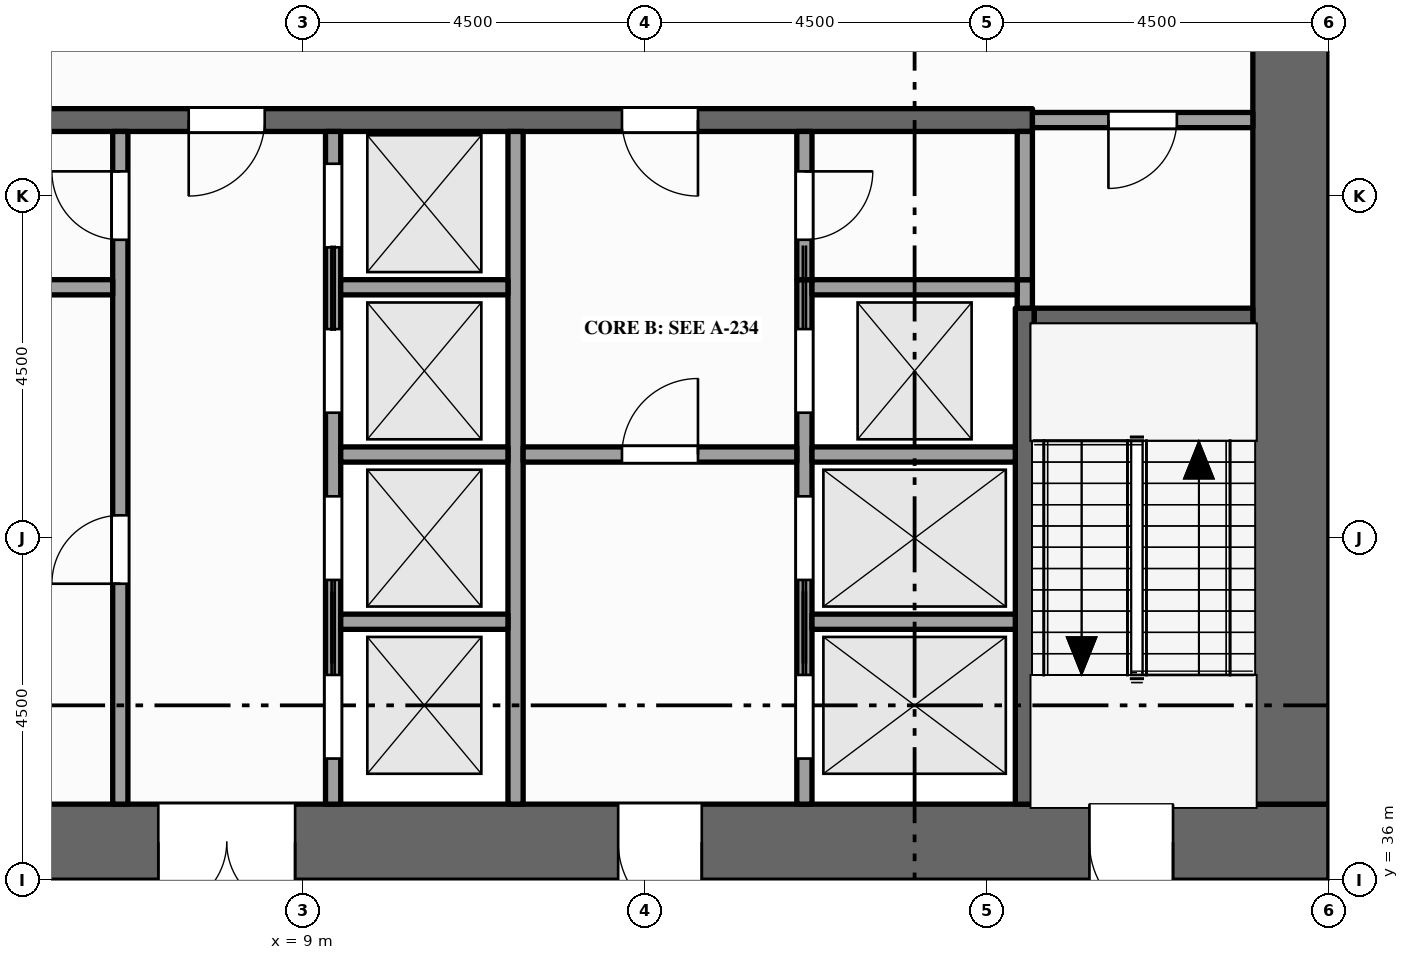
"""IFC4 building model, lengths in metres.
Left out: names, types, materials, properties, quantities, classifications, styles, units other than length and angle.
Written with IfcOpenShell. Run it as: python <this file> out.ifc"""

import sys

from ifc_helpers import new_model, si_unit, direction, frame, frame_2d, origin, place, context, subcontext, project, spatial, rectangle, extrude, element, fill, save


model = new_model("IFC4")
c1 = context("Model", 3, precision=1e-05, world=origin(), true_north=direction((0.0, 1.0)))
c2 = subcontext(c1, "Body", "Model", "MODEL_VIEW")
j1 = project(units=[si_unit("LENGTHUNIT", "METRE"), si_unit("PLANEANGLEUNIT", "RADIAN")], contexts=[c1])
p1 = place(None, origin())
s1 = spatial("IfcSite", under=j1, at=p1, CompositionType="ELEMENT")
p2 = place(p1, origin())
s2 = spatial("IfcBuilding", under=s1, at=p2, CompositionType="ELEMENT")
p3 = place(p2, frame((0.0, 0.0, 187.0)))
s3 = spatial("IfcBuildingStorey", under=s2, at=p3, CompositionType="ELEMENT", Elevation=187.0)
p4 = place(p3, frame((0.0, 36.5, -0.15), z_axis=(0.0, 0.0, 1.0), x_axis=(1.0, 0.0, 0.0)))
e1 = element("IfcWall", 1, at=p4, inside=s3, PredefinedType="SHEAR", context=c2, shape_type="SweptSolid", body=[
    extrude(rectangle(XDim=22.5, YDim=1.0, at=frame_2d((11.25, 0.0))), origin(), (0.0, 0.0, 1.0), 8.0),
])
p5 = place(p4, frame((7.1, 0.0, 0.15)))
e2 = element("IfcOpeningElement", 2, at=p5, cuts=e1, PredefinedType="OPENING", context=c2, shape_type="SweptSolid", body=[
    extrude(rectangle(XDim=1.8, YDim=2.1, at=frame_2d((0.9, 1.05))), frame((0.0, 0.51, 0.0), z_axis=(0.0, -1.0, 0.0), x_axis=(1.0, 0.0, 0.0)), (0.0, 0.0, 1.0), 1.02),
])
p6 = place(p4, frame((13.15, 0.0, 0.15)))
e3 = element("IfcOpeningElement", 3, at=p6, cuts=e1, PredefinedType="OPENING", context=c2, shape_type="SweptSolid", body=[
    extrude(rectangle(XDim=1.1, YDim=2.1, at=frame_2d((0.55, 1.05))), frame((0.0, 0.51, 0.0), z_axis=(0.0, -1.0, 0.0), x_axis=(1.0, 0.0, 0.0)), (0.0, 0.0, 1.0), 1.02),
])
p7 = place(p4, frame((2.15, 0.0, 0.15)))
e4 = element("IfcOpeningElement", 4, at=p7, cuts=e1, PredefinedType="OPENING", context=c2, shape_type="SweptSolid", body=[
    extrude(rectangle(XDim=1.1, YDim=2.1, at=frame_2d((0.55, 1.05))), frame((0.0, 0.51, 0.0), z_axis=(0.0, -1.0, 0.0), x_axis=(1.0, 0.0, 0.0)), (0.0, 0.0, 1.0), 1.02),
])
p8 = place(p4, frame((19.35, 0.0, 0.15)))
e5 = element("IfcOpeningElement", 5, at=p8, cuts=e1, PredefinedType="OPENING", context=c2, shape_type="SweptSolid", body=[
    extrude(rectangle(XDim=1.1, YDim=2.1, at=frame_2d((0.55, 1.05))), frame((0.0, 0.51, 0.0), z_axis=(0.0, -1.0, 0.0), x_axis=(1.0, 0.0, 0.0)), (0.0, 0.0, 1.0), 1.02),
])
p9 = place(p3, frame((22.0, 37.0, -0.15), z_axis=(0.0, 0.0, 1.0), x_axis=(0.0, 1.0, 0.0)))
e6 = element("IfcWall", 6, at=p9, inside=s3, PredefinedType="SHEAR", context=c2, shape_type="SweptSolid", body=[
    extrude(rectangle(XDim=11.5, YDim=1.0, at=frame_2d((5.75, 0.0))), origin(), (0.0, 0.0, 1.0), 8.0),
])
p10 = place(p3, frame((6.6, 37.0, 0.0), z_axis=(0.0, 0.0, 1.0), x_axis=(0.0, 1.0, 0.0)))
e7 = element("IfcWall", 7, at=p10, inside=s3, PredefinedType="PARTITIONING", context=c2, shape_type="SweptSolid", body=[
    extrude(rectangle(XDim=8.85, YDim=0.2, at=frame_2d((4.425, 0.0))), origin(), (0.0, 0.0, 1.0), 7.85),
])
p11 = place(p10, frame((2.9, 0.0, 0.0)))
e8 = element("IfcOpeningElement", 8, at=p11, cuts=e7, PredefinedType="OPENING", context=c2, shape_type="SweptSolid", body=[
    extrude(rectangle(XDim=0.9, YDim=2.1, at=frame_2d((0.45, 1.05))), frame((0.0, 0.11, 0.0), z_axis=(0.0, -1.0, 0.0), x_axis=(1.0, 0.0, 0.0)), (0.0, 0.0, 1.0), 0.22),
])
p12 = place(p10, frame((7.425, 0.0, 0.0)))
e9 = element("IfcOpeningElement", 9, at=p12, cuts=e7, PredefinedType="OPENING", context=c2, shape_type="SweptSolid", body=[
    extrude(rectangle(XDim=0.9, YDim=2.1, at=frame_2d((0.45, 1.05))), frame((0.0, 0.11, 0.0), z_axis=(0.0, -1.0, 0.0), x_axis=(1.0, 0.0, 0.0)), (0.0, 0.0, 1.0), 0.22),
])
p13 = place(p3, frame((9.4, 37.0, 0.0), z_axis=(0.0, 0.0, 1.0), x_axis=(0.0, 1.0, 0.0)))
e10 = element("IfcWall", 10, at=p13, inside=s3, PredefinedType="SOLIDWALL", context=c2, shape_type="SweptSolid", body=[
    extrude(rectangle(XDim=8.85, YDim=0.2, at=frame_2d((4.425, 0.0))), origin(), (0.0, 0.0, 1.0), 7.85),
])
p14 = place(p13, frame((0.6, 0.0, 0.012)))
e11 = element("IfcOpeningElement", 11, at=p14, cuts=e10, PredefinedType="OPENING", context=c2, shape_type="SweptSolid", body=[
    extrude(rectangle(XDim=1.1, YDim=2.1, at=frame_2d((0.55, 1.05))), frame((0.0, 0.11, 0.0), z_axis=(0.0, -1.0, 0.0), x_axis=(1.0, 0.0, 0.0)), (0.0, 0.0, 1.0), 0.22),
])
p15 = place(p13, frame((2.95, 0.0, 0.012)))
e12 = element("IfcOpeningElement", 12, at=p15, cuts=e10, PredefinedType="OPENING", context=c2, shape_type="SweptSolid", body=[
    extrude(rectangle(XDim=1.1, YDim=2.1, at=frame_2d((0.55, 1.05))), frame((0.0, 0.11, 0.0), z_axis=(0.0, -1.0, 0.0), x_axis=(1.0, 0.0, 0.0)), (0.0, 0.0, 1.0), 0.22),
])
p16 = place(p13, frame((5.15, 0.0, 0.012)))
e13 = element("IfcOpeningElement", 13, at=p16, cuts=e10, PredefinedType="OPENING", context=c2, shape_type="SweptSolid", body=[
    extrude(rectangle(XDim=1.1, YDim=2.1, at=frame_2d((0.55, 1.05))), frame((0.0, 0.11, 0.0), z_axis=(0.0, -1.0, 0.0), x_axis=(1.0, 0.0, 0.0)), (0.0, 0.0, 1.0), 0.22),
])
p17 = place(p13, frame((7.325, 0.0, 0.012)))
e14 = element("IfcOpeningElement", 14, at=p17, cuts=e10, PredefinedType="OPENING", context=c2, shape_type="SweptSolid", body=[
    extrude(rectangle(XDim=1.1, YDim=2.1, at=frame_2d((0.55, 1.05))), frame((0.0, 0.11, 0.0), z_axis=(0.0, -1.0, 0.0), x_axis=(1.0, 0.0, 0.0)), (0.0, 0.0, 1.0), 0.22),
])
p18 = place(p3, frame((11.8, 37.0, 0.0), z_axis=(0.0, 0.0, 1.0), x_axis=(0.0, 1.0, 0.0)))
e15 = element("IfcWall", 15, at=p18, inside=s3, PredefinedType="SOLIDWALL", context=c2, shape_type="SweptSolid", body=[
    extrude(rectangle(XDim=8.85, YDim=0.2, at=frame_2d((4.425, 0.0))), origin(), (0.0, 0.0, 1.0), 7.85),
])
p19 = place(p3, frame((15.6, 37.0, 0.0), z_axis=(0.0, 0.0, 1.0), x_axis=(0.0, 1.0, 0.0)))
e16 = element("IfcWall", 16, at=p19, inside=s3, PredefinedType="SOLIDWALL", context=c2, shape_type="SweptSolid", body=[
    extrude(rectangle(XDim=6.9, YDim=0.2, at=frame_2d((3.45, 0.0))), origin(), (0.0, 0.0, 1.0), 7.85),
])
p20 = place(p19, frame((0.6, 0.0, 0.012)))
e17 = element("IfcOpeningElement", 17, at=p20, cuts=e16, PredefinedType="OPENING", context=c2, shape_type="SweptSolid", body=[
    extrude(rectangle(XDim=1.1, YDim=2.1, at=frame_2d((0.55, 1.05))), frame((0.0, 0.11, 0.0), z_axis=(0.0, -1.0, 0.0), x_axis=(1.0, 0.0, 0.0)), (0.0, 0.0, 1.0), 0.22),
])
p21 = place(p19, frame((2.95, 0.0, 0.012)))
e18 = element("IfcOpeningElement", 18, at=p21, cuts=e16, PredefinedType="OPENING", context=c2, shape_type="SweptSolid", body=[
    extrude(rectangle(XDim=1.1, YDim=2.1, at=frame_2d((0.55, 1.05))), frame((0.0, 0.11, 0.0), z_axis=(0.0, -1.0, 0.0), x_axis=(1.0, 0.0, 0.0)), (0.0, 0.0, 1.0), 0.22),
])
p22 = place(p19, frame((5.15, 0.0, 0.012)))
e19 = element("IfcOpeningElement", 19, at=p22, cuts=e16, PredefinedType="OPENING", context=c2, shape_type="SweptSolid", body=[
    extrude(rectangle(XDim=1.1, YDim=2.1, at=frame_2d((0.55, 1.05))), frame((0.0, 0.11, 0.0), z_axis=(0.0, -1.0, 0.0), x_axis=(1.0, 0.0, 0.0)), (0.0, 0.0, 1.0), 0.22),
])
p23 = place(p3, frame((15.6, 43.9, 0.0), z_axis=(0.0, 0.0, 1.0), x_axis=(0.0, 1.0, 0.0)))
e20 = element("IfcWall", 20, at=p23, inside=s3, PredefinedType="PARTITIONING", context=c2, shape_type="SweptSolid", body=[
    extrude(rectangle(XDim=1.95, YDim=0.2, at=frame_2d((0.975, 0.0))), origin(), (0.0, 0.0, 1.0), 7.85),
])
p24 = place(p23, frame((0.525, 0.0, 0.0)))
e21 = element("IfcOpeningElement", 21, at=p24, cuts=e20, PredefinedType="OPENING", context=c2, shape_type="SweptSolid", body=[
    extrude(rectangle(XDim=0.9, YDim=2.1, at=frame_2d((0.45, 1.05))), frame((0.0, 0.11, 0.0), z_axis=(0.0, -1.0, 0.0), x_axis=(1.0, 0.0, 0.0)), (0.0, 0.0, 1.0), 0.22),
])
p25 = place(p3, frame((18.5, 37.0, 0.0), z_axis=(0.0, 0.0, 1.0), x_axis=(0.0, 1.0, 0.0)))
e22 = element("IfcWall", 22, at=p25, inside=s3, PredefinedType="SHEAR", context=c2, shape_type="SweptSolid", body=[
    extrude(rectangle(XDim=6.525, YDim=0.25, at=frame_2d((3.262, 0.0))), origin(), (0.0, 0.0, 1.0), 7.85),
])
p26 = place(p3, frame((18.5, 43.525, 0.0), z_axis=(0.0, 0.0, 1.0), x_axis=(0.0, 1.0, 0.0)))
e23 = element("IfcWall", 23, at=p26, inside=s3, PredefinedType="SOLIDWALL", context=c2, shape_type="SweptSolid", body=[
    extrude(rectangle(XDim=0.375, YDim=0.2, at=frame_2d((0.188, 0.0))), origin(), (0.0, 0.0, 1.0), 7.85),
])
p27 = place(p3, frame((18.5, 43.9, 0.0), z_axis=(0.0, 0.0, 1.0), x_axis=(0.0, 1.0, 0.0)))
e24 = element("IfcWall", 24, at=p27, inside=s3, PredefinedType="PARTITIONING", context=c2, shape_type="SweptSolid", body=[
    extrude(rectangle(XDim=1.95, YDim=0.2, at=frame_2d((0.975, 0.0))), origin(), (0.0, 0.0, 1.0), 7.85),
])
p28 = place(p3, frame((9.5, 39.4, 0.0), z_axis=(0.0, 0.0, 1.0), x_axis=(1.0, 0.0, 0.0)))
e25 = element("IfcWall", 25, at=p28, inside=s3, PredefinedType="SOLIDWALL", context=c2, shape_type="SweptSolid", body=[
    extrude(rectangle(XDim=2.2, YDim=0.2, at=frame_2d((1.1, 0.0))), origin(), (0.0, 0.0, 1.0), 7.85),
])
p29 = place(p3, frame((15.7, 39.4, 0.0), z_axis=(0.0, 0.0, 1.0), x_axis=(1.0, 0.0, 0.0)))
e26 = element("IfcWall", 26, at=p29, inside=s3, PredefinedType="SOLIDWALL", context=c2, shape_type="SweptSolid", body=[
    extrude(rectangle(XDim=2.675, YDim=0.2, at=frame_2d((1.337, 0.0))), origin(), (0.0, 0.0, 1.0), 7.85),
])
p30 = place(p3, frame((9.5, 41.6, 0.0), z_axis=(0.0, 0.0, 1.0), x_axis=(1.0, 0.0, 0.0)))
e27 = element("IfcWall", 27, at=p30, inside=s3, PredefinedType="SOLIDWALL", context=c2, shape_type="SweptSolid", body=[
    extrude(rectangle(XDim=2.2, YDim=0.2, at=frame_2d((1.1, 0.0))), origin(), (0.0, 0.0, 1.0), 7.85),
])
p31 = place(p3, frame((11.9, 41.6, 0.0), z_axis=(0.0, 0.0, 1.0), x_axis=(1.0, 0.0, 0.0)))
e28 = element("IfcWall", 28, at=p31, inside=s3, PredefinedType="PARTITIONING", context=c2, shape_type="SweptSolid", body=[
    extrude(rectangle(XDim=3.6, YDim=0.2, at=frame_2d((1.8, 0.0))), origin(), (0.0, 0.0, 1.0), 7.85),
])
p32 = place(p31, frame((1.3, 0.0, 0.0)))
e29 = element("IfcOpeningElement", 29, at=p32, cuts=e28, PredefinedType="OPENING", context=c2, shape_type="SweptSolid", body=[
    extrude(rectangle(XDim=1.0, YDim=2.1, at=frame_2d((0.5, 1.05))), frame((0.0, 0.11, 0.0), z_axis=(0.0, -1.0, 0.0), x_axis=(1.0, 0.0, 0.0)), (0.0, 0.0, 1.0), 0.22),
])
p33 = place(p3, frame((15.7, 41.6, 0.0), z_axis=(0.0, 0.0, 1.0), x_axis=(1.0, 0.0, 0.0)))
e30 = element("IfcWall", 30, at=p33, inside=s3, PredefinedType="SOLIDWALL", context=c2, shape_type="SweptSolid", body=[
    extrude(rectangle(XDim=2.675, YDim=0.2, at=frame_2d((1.337, 0.0))), origin(), (0.0, 0.0, 1.0), 7.85),
])
p34 = place(p3, frame((18.625, 43.4, 0.0), z_axis=(0.0, 0.0, 1.0), x_axis=(1.0, 0.0, 0.0)))
e31 = element("IfcWall", 31, at=p34, inside=s3, PredefinedType="SHEAR", context=c2, shape_type="SweptSolid", body=[
    extrude(rectangle(XDim=2.875, YDim=0.25, at=frame_2d((1.438, 0.0))), origin(), (0.0, 0.0, 1.0), 7.85),
])
p35 = place(p3, frame((4.3, 43.8, 0.0), z_axis=(0.0, 0.0, 1.0), x_axis=(1.0, 0.0, 0.0)))
e32 = element("IfcWall", 32, at=p35, inside=s3, PredefinedType="PARTITIONING", context=c2, shape_type="SweptSolid", body=[
    extrude(rectangle(XDim=2.2, YDim=0.2, at=frame_2d((1.1, 0.0))), origin(), (0.0, 0.0, 1.0), 7.85),
])
p36 = place(p3, frame((9.5, 43.8, 0.0), z_axis=(0.0, 0.0, 1.0), x_axis=(1.0, 0.0, 0.0)))
e33 = element("IfcWall", 33, at=p36, inside=s3, PredefinedType="SOLIDWALL", context=c2, shape_type="SweptSolid", body=[
    extrude(rectangle(XDim=2.2, YDim=0.2, at=frame_2d((1.1, 0.0))), origin(), (0.0, 0.0, 1.0), 7.85),
])
p37 = place(p3, frame((15.7, 43.8, 0.0), z_axis=(0.0, 0.0, 1.0), x_axis=(1.0, 0.0, 0.0)))
e34 = element("IfcWall", 34, at=p37, inside=s3, PredefinedType="SOLIDWALL", context=c2, shape_type="SweptSolid", body=[
    extrude(rectangle(XDim=2.7, YDim=0.2, at=frame_2d((1.35, 0.0))), origin(), (0.0, 0.0, 1.0), 7.85),
])
p38 = place(p3, frame((4.1, 46.0, 0.0), z_axis=(0.0, 0.0, 1.0), x_axis=(1.0, 0.0, 0.0)))
e35 = element("IfcWall", 35, at=p38, inside=s3, PredefinedType="SHEAR", context=c2, shape_type="SweptSolid", body=[
    extrude(rectangle(XDim=14.5, YDim=0.3, at=frame_2d((7.25, 0.0))), origin(), (0.0, 0.0, 1.0), 7.85),
])
p39 = place(p38, frame((3.4, 0.0, 0.0)))
e36 = element("IfcOpeningElement", 36, at=p39, cuts=e35, PredefinedType="OPENING", context=c2, shape_type="SweptSolid", body=[
    extrude(rectangle(XDim=1.0, YDim=2.1, at=frame_2d((0.5, 1.05))), frame((0.0, 0.16, 0.0), z_axis=(0.0, -1.0, 0.0), x_axis=(1.0, 0.0, 0.0)), (0.0, 0.0, 1.0), 0.32),
])
p40 = place(p38, frame((9.1, 0.0, 0.0)))
e37 = element("IfcOpeningElement", 37, at=p40, cuts=e35, PredefinedType="OPENING", context=c2, shape_type="SweptSolid", body=[
    extrude(rectangle(XDim=1.0, YDim=2.1, at=frame_2d((0.5, 1.05))), frame((0.0, 0.16, 0.0), z_axis=(0.0, -1.0, 0.0), x_axis=(1.0, 0.0, 0.0)), (0.0, 0.0, 1.0), 0.32),
])
p41 = place(p3, frame((18.6, 46.0, 0.0), z_axis=(0.0, 0.0, 1.0), x_axis=(1.0, 0.0, 0.0)))
e38 = element("IfcWall", 38, at=p41, inside=s3, PredefinedType="PARTITIONING", context=c2, shape_type="SweptSolid", body=[
    extrude(rectangle(XDim=2.9, YDim=0.2, at=frame_2d((1.45, 0.0))), origin(), (0.0, 0.0, 1.0), 7.85),
])
p42 = place(p41, frame((1.0, 0.0, 0.0)))
e39 = element("IfcOpeningElement", 39, at=p42, cuts=e38, PredefinedType="OPENING", context=c2, shape_type="SweptSolid", body=[
    extrude(rectangle(XDim=0.9, YDim=2.1, at=frame_2d((0.45, 1.05))), frame((0.0, 0.11, 0.0), z_axis=(0.0, -1.0, 0.0), x_axis=(1.0, 0.0, 0.0)), (0.0, 0.0, 1.0), 0.22),
])
p43 = place(p14, origin())
e40 = element("IfcDoor", 40, at=p43, inside=s3, OperationType="SLIDING_TO_RIGHT", PredefinedType="DOOR", context=c2, shape_type="SweptSolid", body=[
    extrude(rectangle(XDim=1.1, YDim=2.1, at=frame_2d((0.55, 1.05))), frame((0.0, 0.025, 0.0), z_axis=(0.0, -1.0, 0.0), x_axis=(1.0, 0.0, 0.0)), (0.0, 0.0, 1.0), 0.05),
])
fill(e11, e40)
p44 = place(p15, origin())
e41 = element("IfcDoor", 41, at=p44, inside=s3, OperationType="SLIDING_TO_LEFT", PredefinedType="DOOR", context=c2, shape_type="SweptSolid", body=[
    extrude(rectangle(XDim=1.1, YDim=2.1, at=frame_2d((0.55, 1.05))), frame((0.0, 0.025, 0.0), z_axis=(0.0, -1.0, 0.0), x_axis=(1.0, 0.0, 0.0)), (0.0, 0.0, 1.0), 0.05),
])
fill(e12, e41)
p45 = place(p16, origin())
e42 = element("IfcDoor", 42, at=p45, inside=s3, OperationType="SLIDING_TO_RIGHT", PredefinedType="DOOR", context=c2, shape_type="SweptSolid", body=[
    extrude(rectangle(XDim=1.1, YDim=2.1, at=frame_2d((0.55, 1.05))), frame((0.0, 0.025, 0.0), z_axis=(0.0, -1.0, 0.0), x_axis=(1.0, 0.0, 0.0)), (0.0, 0.0, 1.0), 0.05),
])
fill(e13, e42)
p46 = place(p17, origin())
e43 = element("IfcDoor", 43, at=p46, inside=s3, OperationType="SLIDING_TO_LEFT", PredefinedType="DOOR", context=c2, shape_type="SweptSolid", body=[
    extrude(rectangle(XDim=1.1, YDim=2.1, at=frame_2d((0.55, 1.05))), frame((0.0, 0.025, 0.0), z_axis=(0.0, -1.0, 0.0), x_axis=(1.0, 0.0, 0.0)), (0.0, 0.0, 1.0), 0.05),
])
fill(e14, e43)
p47 = place(p20, origin())
e44 = element("IfcDoor", 44, at=p47, inside=s3, OperationType="SLIDING_TO_RIGHT", PredefinedType="DOOR", context=c2, shape_type="SweptSolid", body=[
    extrude(rectangle(XDim=1.1, YDim=2.1, at=frame_2d((0.55, 1.05))), frame((0.0, 0.025, 0.0), z_axis=(0.0, -1.0, 0.0), x_axis=(1.0, 0.0, 0.0)), (0.0, 0.0, 1.0), 0.05),
])
fill(e17, e44)
p48 = place(p21, origin())
e45 = element("IfcDoor", 45, at=p48, inside=s3, OperationType="SLIDING_TO_LEFT", PredefinedType="DOOR", context=c2, shape_type="SweptSolid", body=[
    extrude(rectangle(XDim=1.1, YDim=2.1, at=frame_2d((0.55, 1.05))), frame((0.0, 0.025, 0.0), z_axis=(0.0, -1.0, 0.0), x_axis=(1.0, 0.0, 0.0)), (0.0, 0.0, 1.0), 0.05),
])
fill(e18, e45)
p49 = place(p22, origin())
e46 = element("IfcDoor", 46, at=p49, inside=s3, OperationType="SLIDING_TO_RIGHT", PredefinedType="DOOR", context=c2, shape_type="SweptSolid", body=[
    extrude(rectangle(XDim=1.1, YDim=2.1, at=frame_2d((0.55, 1.05))), frame((0.0, 0.025, 0.0), z_axis=(0.0, -1.0, 0.0), x_axis=(1.0, 0.0, 0.0)), (0.0, 0.0, 1.0), 0.05),
])
fill(e19, e46)
p50 = place(p5, origin())
e47 = element("IfcDoor", 47, at=p50, inside=s3, OperationType="DOUBLE_DOOR_SINGLE_SWING", PredefinedType="DOOR", context=c2, shape_type="SweptSolid", body=[
    extrude(rectangle(XDim=1.8, YDim=2.1, at=frame_2d((0.9, 1.05))), frame((0.0, 0.025, 0.0), z_axis=(0.0, -1.0, 0.0), x_axis=(1.0, 0.0, 0.0)), (0.0, 0.0, 1.0), 0.05),
])
fill(e2, e47)
p51 = place(p39, origin())
e48 = element("IfcDoor", 48, at=p51, inside=s3, OperationType="SINGLE_SWING_LEFT", PredefinedType="DOOR", context=c2, shape_type="SweptSolid", body=[
    extrude(rectangle(XDim=1.0, YDim=2.1, at=frame_2d((0.5, 1.05))), frame((0.0, 0.025, 0.0), z_axis=(0.0, -1.0, 0.0), x_axis=(1.0, 0.0, 0.0)), (0.0, 0.0, 1.0), 0.05),
])
fill(e36, e48)
p52 = place(p6, origin())
e49 = element("IfcDoor", 49, at=p52, inside=s3, OperationType="SINGLE_SWING_RIGHT", PredefinedType="DOOR", context=c2, shape_type="SweptSolid", body=[
    extrude(rectangle(XDim=1.1, YDim=2.1, at=frame_2d((0.55, 1.05))), frame((0.0, 0.025, 0.0), z_axis=(0.0, -1.0, 0.0), x_axis=(1.0, 0.0, 0.0)), (0.0, 0.0, 1.0), 0.05),
])
fill(e3, e49)
p53 = place(p32, origin())
e50 = element("IfcDoor", 50, at=p53, inside=s3, OperationType="SINGLE_SWING_RIGHT", PredefinedType="DOOR", context=c2, shape_type="SweptSolid", body=[
    extrude(rectangle(XDim=1.0, YDim=2.1, at=frame_2d((0.5, 1.05))), frame((0.0, 0.025, 0.0), z_axis=(0.0, -1.0, 0.0), x_axis=(1.0, 0.0, 0.0)), (0.0, 0.0, 1.0), 0.05),
])
fill(e29, e50)
p54 = place(p40, origin())
e51 = element("IfcDoor", 51, at=p54, inside=s3, OperationType="SINGLE_SWING_RIGHT", PredefinedType="DOOR", context=c2, shape_type="SweptSolid", body=[
    extrude(rectangle(XDim=1.0, YDim=2.1, at=frame_2d((0.5, 1.05))), frame((0.0, 0.025, 0.0), z_axis=(0.0, -1.0, 0.0), x_axis=(1.0, 0.0, 0.0)), (0.0, 0.0, 1.0), 0.05),
])
fill(e37, e51)
p55 = place(p8, origin())
e52 = element("IfcDoor", 52, at=p55, inside=s3, OperationType="SINGLE_SWING_RIGHT", PredefinedType="DOOR", context=c2, shape_type="SweptSolid", body=[
    extrude(rectangle(XDim=1.1, YDim=2.1, at=frame_2d((0.55, 1.05))), frame((0.0, 0.025, 0.0), z_axis=(0.0, -1.0, 0.0), x_axis=(1.0, 0.0, 0.0)), (0.0, 0.0, 1.0), 0.05),
])
fill(e5, e52)
p56 = place(p42, origin())
e53 = element("IfcDoor", 53, at=p56, inside=s3, OperationType="SINGLE_SWING_LEFT", PredefinedType="DOOR", context=c2, shape_type="SweptSolid", body=[
    extrude(rectangle(XDim=0.9, YDim=2.1, at=frame_2d((0.45, 1.05))), frame((0.0, 0.025, 0.0), z_axis=(0.0, -1.0, 0.0), x_axis=(1.0, 0.0, 0.0)), (0.0, 0.0, 1.0), 0.05),
])
fill(e39, e53)
p57 = place(p11, origin())
e54 = element("IfcDoor", 54, at=p57, inside=s3, OperationType="SINGLE_SWING_LEFT", PredefinedType="DOOR", context=c2, shape_type="SweptSolid", body=[
    extrude(rectangle(XDim=0.9, YDim=2.1, at=frame_2d((0.45, 1.05))), frame((0.0, 0.025, 0.0), z_axis=(0.0, -1.0, 0.0), x_axis=(1.0, 0.0, 0.0)), (0.0, 0.0, 1.0), 0.05),
])
fill(e8, e54)
p58 = place(p12, origin())
e55 = element("IfcDoor", 55, at=p58, inside=s3, OperationType="SINGLE_SWING_RIGHT", PredefinedType="DOOR", context=c2, shape_type="SweptSolid", body=[
    extrude(rectangle(XDim=0.9, YDim=2.1, at=frame_2d((0.45, 1.05))), frame((0.0, 0.025, 0.0), z_axis=(0.0, -1.0, 0.0), x_axis=(1.0, 0.0, 0.0)), (0.0, 0.0, 1.0), 0.05),
])
fill(e9, e55)
p59 = place(p24, origin())
e56 = element("IfcDoor", 56, at=p59, inside=s3, OperationType="SINGLE_SWING_RIGHT", PredefinedType="DOOR", context=c2, shape_type="SweptSolid", body=[
    extrude(rectangle(XDim=0.9, YDim=2.1, at=frame_2d((0.45, 1.05))), frame((0.0, 0.025, 0.0), z_axis=(0.0, -1.0, 0.0), x_axis=(1.0, 0.0, 0.0)), (0.0, 0.0, 1.0), 0.05),
])
fill(e21, e56)
save(model, sys.argv[1])
